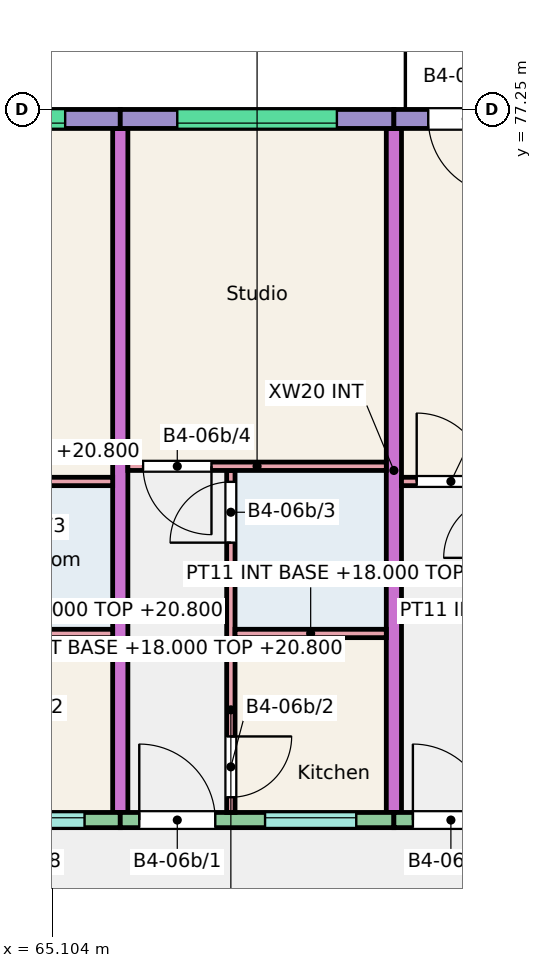
"""IFC4 building model, lengths in metres.
Left out: names, types, materials, properties, quantities, classifications, styles, units other than length and angle.
Written with IfcOpenShell. Run it as: python <this file> out.ifc"""

import sys

from ifc_helpers import new_model, si_unit, direction, frame, frame_2d, origin, place, context, subcontext, project, spatial, rectangle, extrude, element, fill, save


model = new_model("IFC4")
c1 = context("Model", 3, precision=1e-05, world=origin(), true_north=direction((0.0, 1.0)))
c2 = subcontext(c1, "Body", "Model", "MODEL_VIEW")
j1 = project(units=[si_unit("LENGTHUNIT", "METRE"), si_unit("PLANEANGLEUNIT", "RADIAN")], contexts=[c1])
p1 = place(None, origin())
s1 = spatial("IfcSite", under=j1, at=p1, CompositionType="ELEMENT")
p2 = place(p1, origin())
s2 = spatial("IfcBuilding", under=s1, at=p2, CompositionType="ELEMENT")
p3 = place(p2, frame((0.0, 0.0, 18.0)))
s3 = spatial("IfcBuildingStorey", under=s2, at=p3, CompositionType="ELEMENT", Elevation=18.0)
for number, where, z_axis, x_axis in (
    (1, (66.0, 68.0, 0.0), (0.0, 0.0, 1.0), (0.0, 1.0, 0.0)),
    (2, (69.6, 68.0, 0.0), (0.0, 0.0, 1.0), (0.0, 1.0, 0.0)),
):
    element("IfcWall", number, at=place(p3, frame(where, z_axis=z_axis, x_axis=x_axis)), inside=s3, PredefinedType="SHEAR", context=c2, shape_type="SweptSolid", body=[
        extrude(rectangle(XDim=9.0, YDim=0.2, at=frame_2d((4.5, 0.0))), origin(), (0.0, 0.0, 1.0), 3.0),
    ])
p4 = place(p3, frame((62.4, 77.125, 0.0), z_axis=(0.0, 0.0, 1.0), x_axis=(1.0, 0.0, 0.0)))
e3 = element("IfcWall", 3, at=p4, inside=s3, PredefinedType="SOLIDWALL", context=c2, shape_type="SweptSolid", body=[
    extrude(rectangle(XDim=3.6, YDim=0.25, at=frame_2d((1.8, 0.0))), origin(), (0.0, 0.0, 1.0), 3.0),
])
p5 = place(p4, frame((0.775, 0.0, 1.2)))
e4 = element("IfcOpeningElement", 4, at=p5, cuts=e3, PredefinedType="OPENING", context=c2, shape_type="SweptSolid", body=[
    extrude(rectangle(XDim=2.1, YDim=1.2, at=frame_2d((1.05, 0.6))), frame((0.0, 0.135, 0.0), z_axis=(0.0, -1.0, 0.0), x_axis=(1.0, 0.0, 0.0)), (0.0, 0.0, 1.0), 0.27),
])
p6 = place(p3, frame((62.55, 67.9, 0.0), z_axis=(0.0, 0.0, 1.0), x_axis=(1.0, 0.0, 0.0)))
e5 = element("IfcWall", 5, at=p6, inside=s3, PredefinedType="SOLIDWALL", context=c2, shape_type="SweptSolid", body=[
    extrude(rectangle(XDim=3.45, YDim=0.2, at=frame_2d((1.725, 0.0))), origin(), (0.0, 0.0, 1.0), 3.0),
])
p7 = place(p6, frame((1.78, 0.0, 1.1)))
e6 = element("IfcOpeningElement", 6, at=p7, cuts=e5, PredefinedType="OPENING", context=c2, shape_type="SweptSolid", body=[
    extrude(rectangle(XDim=1.2, YDim=1.3, at=frame_2d((0.6, 0.65))), frame((0.0, 0.11, 0.0), z_axis=(0.0, -1.0, 0.0), x_axis=(1.0, 0.0, 0.0)), (0.0, 0.0, 1.0), 0.22),
])
p8 = place(p6, frame((0.15, 0.0, 0.0)))
e7 = element("IfcOpeningElement", 7, at=p8, cuts=e5, PredefinedType="OPENING", context=c2, shape_type="SweptSolid", body=[
    extrude(rectangle(XDim=1.0, YDim=2.1, at=frame_2d((0.5, 1.05))), frame((0.0, 0.11, 0.0), z_axis=(0.0, -1.0, 0.0), x_axis=(1.0, 0.0, 0.0)), (0.0, 0.0, 1.0), 0.22),
])
p9 = place(p3, frame((66.0, 77.125, 0.0), z_axis=(0.0, 0.0, 1.0), x_axis=(1.0, 0.0, 0.0)))
e8 = element("IfcWall", 8, at=p9, inside=s3, PredefinedType="SOLIDWALL", context=c2, shape_type="SweptSolid", body=[
    extrude(rectangle(XDim=3.6, YDim=0.25, at=frame_2d((1.8, 0.0))), origin(), (0.0, 0.0, 1.0), 3.0),
])
p10 = place(p9, frame((0.75, 0.0, 1.2)))
e9 = element("IfcOpeningElement", 9, at=p10, cuts=e8, PredefinedType="OPENING", context=c2, shape_type="SweptSolid", body=[
    extrude(rectangle(XDim=2.1, YDim=1.2, at=frame_2d((1.05, 0.6))), frame((0.0, 0.135, 0.0), z_axis=(0.0, -1.0, 0.0), x_axis=(1.0, 0.0, 0.0)), (0.0, 0.0, 1.0), 0.27),
])
p11 = place(p3, frame((66.0, 67.9, 0.0), z_axis=(0.0, 0.0, 1.0), x_axis=(1.0, 0.0, 0.0)))
e10 = element("IfcWall", 10, at=p11, inside=s3, PredefinedType="SOLIDWALL", context=c2, shape_type="SweptSolid", body=[
    extrude(rectangle(XDim=3.6, YDim=0.2, at=frame_2d((1.8, 0.0))), origin(), (0.0, 0.0, 1.0), 3.0),
])
p12 = place(p11, frame((1.905, 0.0, 1.1)))
e11 = element("IfcOpeningElement", 11, at=p12, cuts=e10, PredefinedType="OPENING", context=c2, shape_type="SweptSolid", body=[
    extrude(rectangle(XDim=1.2, YDim=1.3, at=frame_2d((0.6, 0.65))), frame((0.0, 0.11, 0.0), z_axis=(0.0, -1.0, 0.0), x_axis=(1.0, 0.0, 0.0)), (0.0, 0.0, 1.0), 0.22),
])
p13 = place(p11, frame((0.25, 0.0, 0.0)))
e12 = element("IfcOpeningElement", 12, at=p13, cuts=e10, PredefinedType="OPENING", context=c2, shape_type="SweptSolid", body=[
    extrude(rectangle(XDim=1.0, YDim=2.1, at=frame_2d((0.5, 1.05))), frame((0.0, 0.11, 0.0), z_axis=(0.0, -1.0, 0.0), x_axis=(1.0, 0.0, 0.0)), (0.0, 0.0, 1.0), 0.22),
])
p14 = place(p3, frame((69.6, 77.125, 0.0), z_axis=(0.0, 0.0, 1.0), x_axis=(1.0, 0.0, 0.0)))
e13 = element("IfcWall", 13, at=p14, inside=s3, PredefinedType="SOLIDWALL", context=c2, shape_type="SweptSolid", body=[
    extrude(rectangle(XDim=3.6, YDim=0.25, at=frame_2d((1.8, 0.0))), origin(), (0.0, 0.0, 1.0), 3.0),
])
p15 = place(p14, frame((1.763, 0.0, 1.2)))
e14 = element("IfcOpeningElement", 14, at=p15, cuts=e13, PredefinedType="OPENING", context=c2, shape_type="SweptSolid", body=[
    extrude(rectangle(XDim=1.5, YDim=1.2, at=frame_2d((0.75, 0.6))), frame((0.0, 0.135, 0.0), z_axis=(0.0, -1.0, 0.0), x_axis=(1.0, 0.0, 0.0)), (0.0, 0.0, 1.0), 0.27),
])
p16 = place(p14, frame((0.452, 0.0, 0.0)))
e15 = element("IfcOpeningElement", 15, at=p16, cuts=e13, PredefinedType="OPENING", context=c2, shape_type="SweptSolid", body=[
    extrude(rectangle(XDim=1.0, YDim=2.1, at=frame_2d((0.5, 1.05))), frame((0.0, 0.135, 0.0), z_axis=(0.0, -1.0, 0.0), x_axis=(1.0, 0.0, 0.0)), (0.0, 0.0, 1.0), 0.27),
])
p17 = place(p3, frame((69.6, 67.9, 0.0), z_axis=(0.0, 0.0, 1.0), x_axis=(1.0, 0.0, 0.0)))
e16 = element("IfcWall", 16, at=p17, inside=s3, PredefinedType="SOLIDWALL", context=c2, shape_type="SweptSolid", body=[
    extrude(rectangle(XDim=3.6, YDim=0.2, at=frame_2d((1.8, 0.0))), origin(), (0.0, 0.0, 1.0), 3.0),
])
p18 = place(p17, frame((1.893, 0.0, 1.1)))
e17 = element("IfcOpeningElement", 17, at=p18, cuts=e16, PredefinedType="OPENING", context=c2, shape_type="SweptSolid", body=[
    extrude(rectangle(XDim=1.2, YDim=1.3, at=frame_2d((0.6, 0.65))), frame((0.0, 0.11, 0.0), z_axis=(0.0, -1.0, 0.0), x_axis=(1.0, 0.0, 0.0)), (0.0, 0.0, 1.0), 0.22),
])
p19 = place(p17, frame((0.25, 0.0, 0.0)))
e18 = element("IfcOpeningElement", 18, at=p19, cuts=e16, PredefinedType="OPENING", context=c2, shape_type="SweptSolid", body=[
    extrude(rectangle(XDim=1.0, YDim=2.1, at=frame_2d((0.5, 1.05))), frame((0.0, 0.11, 0.0), z_axis=(0.0, -1.0, 0.0), x_axis=(1.0, 0.0, 0.0)), (0.0, 0.0, 1.0), 0.22),
])
p20 = place(p3, frame((63.96, 70.355, 0.0), z_axis=(0.0, 0.0, 1.0), x_axis=(1.0, 0.0, 0.0)))
e19 = element("IfcWall", 19, at=p20, inside=s3, PredefinedType="PARTITIONING", context=c2, shape_type="SweptSolid", body=[
    extrude(rectangle(XDim=1.94, YDim=0.11, at=frame_2d((0.97, 0.0))), origin(), (0.0, 0.0, 1.0), 2.8),
])
p21 = place(p3, frame((62.55, 72.355, 0.0), z_axis=(0.0, 0.0, 1.0), x_axis=(1.0, 0.0, 0.0)))
e20 = element("IfcWall", 20, at=p21, inside=s3, PredefinedType="PARTITIONING", context=c2, shape_type="SweptSolid", body=[
    extrude(rectangle(XDim=3.35, YDim=0.11, at=frame_2d((1.675, 0.0))), origin(), (0.0, 0.0, 1.0), 2.8),
])
p22 = place(p21, frame((0.2, 0.0, 0.0)))
e21 = element("IfcOpeningElement", 21, at=p22, cuts=e20, PredefinedType="OPENING", context=c2, shape_type="SweptSolid", body=[
    extrude(rectangle(XDim=0.9, YDim=2.1, at=frame_2d((0.45, 1.05))), frame((0.0, 0.065, 0.0), z_axis=(0.0, -1.0, 0.0), x_axis=(1.0, 0.0, 0.0)), (0.0, 0.0, 1.0), 0.13),
])
p23 = place(p3, frame((67.455, 68.0, 0.0), z_axis=(0.0, 0.0, 1.0), x_axis=(0.0, 1.0, 0.0)))
e22 = element("IfcWall", 22, at=p23, inside=s3, PredefinedType="PARTITIONING", context=c2, shape_type="SweptSolid", body=[
    extrude(rectangle(XDim=4.5, YDim=0.11, at=frame_2d((2.25, 0.0))), origin(), (0.0, 0.0, 1.0), 2.8),
])
p24 = place(p23, frame((0.2, 0.0, 0.0)))
e23 = element("IfcOpeningElement", 23, at=p24, cuts=e22, PredefinedType="OPENING", context=c2, shape_type="SweptSolid", body=[
    extrude(rectangle(XDim=0.8, YDim=2.1, at=frame_2d((0.4, 1.05))), frame((0.0, 0.065, 0.0), z_axis=(0.0, -1.0, 0.0), x_axis=(1.0, 0.0, 0.0)), (0.0, 0.0, 1.0), 0.13),
])
p25 = place(p23, frame((3.55, 0.0, 0.0)))
e24 = element("IfcOpeningElement", 24, at=p25, cuts=e22, PredefinedType="OPENING", context=c2, shape_type="SweptSolid", body=[
    extrude(rectangle(XDim=0.8, YDim=2.1, at=frame_2d((0.4, 1.05))), frame((0.0, 0.065, 0.0), z_axis=(0.0, -1.0, 0.0), x_axis=(1.0, 0.0, 0.0)), (0.0, 0.0, 1.0), 0.13),
])
p26 = place(p3, frame((67.51, 70.355, 0.0), z_axis=(0.0, 0.0, 1.0), x_axis=(1.0, 0.0, 0.0)))
e25 = element("IfcWall", 25, at=p26, inside=s3, PredefinedType="PARTITIONING", context=c2, shape_type="SweptSolid", body=[
    extrude(rectangle(XDim=1.99, YDim=0.11, at=frame_2d((0.995, 0.0))), origin(), (0.0, 0.0, 1.0), 2.8),
])
p27 = place(p3, frame((66.1, 72.555, 0.0), z_axis=(0.0, 0.0, 1.0), x_axis=(1.0, 0.0, 0.0)))
e26 = element("IfcWall", 26, at=p27, inside=s3, PredefinedType="PARTITIONING", context=c2, shape_type="SweptSolid", body=[
    extrude(rectangle(XDim=3.4, YDim=0.11, at=frame_2d((1.7, 0.0))), origin(), (0.0, 0.0, 1.0), 2.8),
])
p28 = place(p27, frame((0.2, 0.0, 0.0)))
e27 = element("IfcOpeningElement", 27, at=p28, cuts=e26, PredefinedType="OPENING", context=c2, shape_type="SweptSolid", body=[
    extrude(rectangle(XDim=0.9, YDim=2.1, at=frame_2d((0.45, 1.05))), frame((0.0, 0.065, 0.0), z_axis=(0.0, -1.0, 0.0), x_axis=(1.0, 0.0, 0.0)), (0.0, 0.0, 1.0), 0.13),
])
p29 = place(p3, frame((69.7, 72.355, 0.0), z_axis=(0.0, 0.0, 1.0), x_axis=(1.0, 0.0, 0.0)))
e28 = element("IfcWall", 28, at=p29, inside=s3, PredefinedType="PARTITIONING", context=c2, shape_type="SweptSolid", body=[
    extrude(rectangle(XDim=3.375, YDim=0.11, at=frame_2d((1.688, 0.0))), origin(), (0.0, 0.0, 1.0), 2.8),
])
p30 = place(p29, frame((0.2, 0.0, 0.0)))
e29 = element("IfcOpeningElement", 29, at=p30, cuts=e28, PredefinedType="OPENING", context=c2, shape_type="SweptSolid", body=[
    extrude(rectangle(XDim=0.9, YDim=2.1, at=frame_2d((0.45, 1.05))), frame((0.0, 0.065, 0.0), z_axis=(0.0, -1.0, 0.0), x_axis=(1.0, 0.0, 0.0)), (0.0, 0.0, 1.0), 0.13),
])
p31 = place(p7, origin())
e30 = element("IfcWindow", 30, at=p31, inside=s3, PartitioningType="SINGLE_PANEL", PredefinedType="WINDOW", context=c2, shape_type="SweptSolid", body=[
    extrude(rectangle(XDim=1.2, YDim=1.3, at=frame_2d((0.6, 0.65))), frame((0.0, 0.06, 0.0), z_axis=(0.0, -1.0, 0.0), x_axis=(1.0, 0.0, 0.0)), (0.0, 0.0, 1.0), 0.06),
])
fill(e6, e30)
p32 = place(p5, origin())
e31 = element("IfcWindow", 31, at=p32, inside=s3, PartitioningType="SINGLE_PANEL", PredefinedType="WINDOW", context=c2, shape_type="SweptSolid", body=[
    extrude(rectangle(XDim=2.1, YDim=1.2, at=frame_2d((1.05, 0.6))), frame((0.0, -0.025, 0.0), z_axis=(0.0, -1.0, 0.0), x_axis=(1.0, 0.0, 0.0)), (0.0, 0.0, 1.0), 0.06),
])
fill(e4, e31)
p33 = place(p12, origin())
e32 = element("IfcWindow", 32, at=p33, inside=s3, PartitioningType="SINGLE_PANEL", PredefinedType="WINDOW", context=c2, shape_type="SweptSolid", body=[
    extrude(rectangle(XDim=1.2, YDim=1.3, at=frame_2d((0.6, 0.65))), frame((0.0, 0.06, 0.0), z_axis=(0.0, -1.0, 0.0), x_axis=(1.0, 0.0, 0.0)), (0.0, 0.0, 1.0), 0.06),
])
fill(e11, e32)
p34 = place(p10, origin())
e33 = element("IfcWindow", 33, at=p34, inside=s3, PartitioningType="SINGLE_PANEL", PredefinedType="WINDOW", context=c2, shape_type="SweptSolid", body=[
    extrude(rectangle(XDim=2.1, YDim=1.2, at=frame_2d((1.05, 0.6))), frame((0.0, -0.025, 0.0), z_axis=(0.0, -1.0, 0.0), x_axis=(1.0, 0.0, 0.0)), (0.0, 0.0, 1.0), 0.06),
])
fill(e9, e33)
p35 = place(p13, origin())
e34 = element("IfcDoor", 34, at=p35, inside=s3, OperationType="SINGLE_SWING_LEFT", PredefinedType="DOOR", context=c2, shape_type="SweptSolid", body=[
    extrude(rectangle(XDim=1.0, YDim=2.1, at=frame_2d((0.5, 1.05))), frame((0.0, 0.025, 0.0), z_axis=(0.0, -1.0, 0.0), x_axis=(1.0, 0.0, 0.0)), (0.0, 0.0, 1.0), 0.05),
])
fill(e12, e34)
p36 = place(p24, origin())
e35 = element("IfcDoor", 35, at=p36, inside=s3, OperationType="SINGLE_SWING_RIGHT", PredefinedType="DOOR", context=c2, shape_type="SweptSolid", body=[
    extrude(rectangle(XDim=0.8, YDim=2.1, at=frame_2d((0.4, 1.05))), frame((0.0, 0.025, 0.0), z_axis=(0.0, -1.0, 0.0), x_axis=(1.0, 0.0, 0.0)), (0.0, 0.0, 1.0), 0.05),
])
fill(e23, e35)
p37 = place(p25, origin())
e36 = element("IfcDoor", 36, at=p37, inside=s3, OperationType="SINGLE_SWING_LEFT", PredefinedType="DOOR", context=c2, shape_type="SweptSolid", body=[
    extrude(rectangle(XDim=0.8, YDim=2.1, at=frame_2d((0.4, 1.05))), frame((0.0, 0.025, 0.0), z_axis=(0.0, -1.0, 0.0), x_axis=(1.0, 0.0, 0.0)), (0.0, 0.0, 1.0), 0.05),
])
fill(e24, e36)
p38 = place(p28, origin())
e37 = element("IfcDoor", 37, at=p38, inside=s3, OperationType="SINGLE_SWING_RIGHT", PredefinedType="DOOR", context=c2, shape_type="SweptSolid", body=[
    extrude(rectangle(XDim=0.9, YDim=2.1, at=frame_2d((0.45, 1.05))), frame((0.0, 0.025, 0.0), z_axis=(0.0, -1.0, 0.0), x_axis=(1.0, 0.0, 0.0)), (0.0, 0.0, 1.0), 0.05),
])
fill(e27, e37)
p39 = place(p19, origin())
e38 = element("IfcDoor", 38, at=p39, inside=s3, OperationType="SINGLE_SWING_LEFT", PredefinedType="DOOR", context=c2, shape_type="SweptSolid", body=[
    extrude(rectangle(XDim=1.0, YDim=2.1, at=frame_2d((0.5, 1.05))), frame((0.0, 0.025, 0.0), z_axis=(0.0, -1.0, 0.0), x_axis=(1.0, 0.0, 0.0)), (0.0, 0.0, 1.0), 0.05),
])
fill(e18, e38)
p40 = place(p30, origin())
e39 = element("IfcDoor", 39, at=p40, inside=s3, OperationType="SINGLE_SWING_LEFT", PredefinedType="DOOR", context=c2, shape_type="SweptSolid", body=[
    extrude(rectangle(XDim=0.9, YDim=2.1, at=frame_2d((0.45, 1.05))), frame((0.0, 0.025, 0.0), z_axis=(0.0, -1.0, 0.0), x_axis=(1.0, 0.0, 0.0)), (0.0, 0.0, 1.0), 0.05),
])
fill(e29, e39)
p41 = place(p16, origin())
e40 = element("IfcDoor", 40, at=p41, inside=s3, OperationType="SINGLE_SWING_RIGHT", PredefinedType="DOOR", context=c2, shape_type="SweptSolid", body=[
    extrude(rectangle(XDim=1.0, YDim=2.1, at=frame_2d((0.5, 1.05))), frame((0.0, 0.025, 0.0), z_axis=(0.0, -1.0, 0.0), x_axis=(1.0, 0.0, 0.0)), (0.0, 0.0, 1.0), 0.05),
])
fill(e15, e40)
save(model, sys.argv[1])
